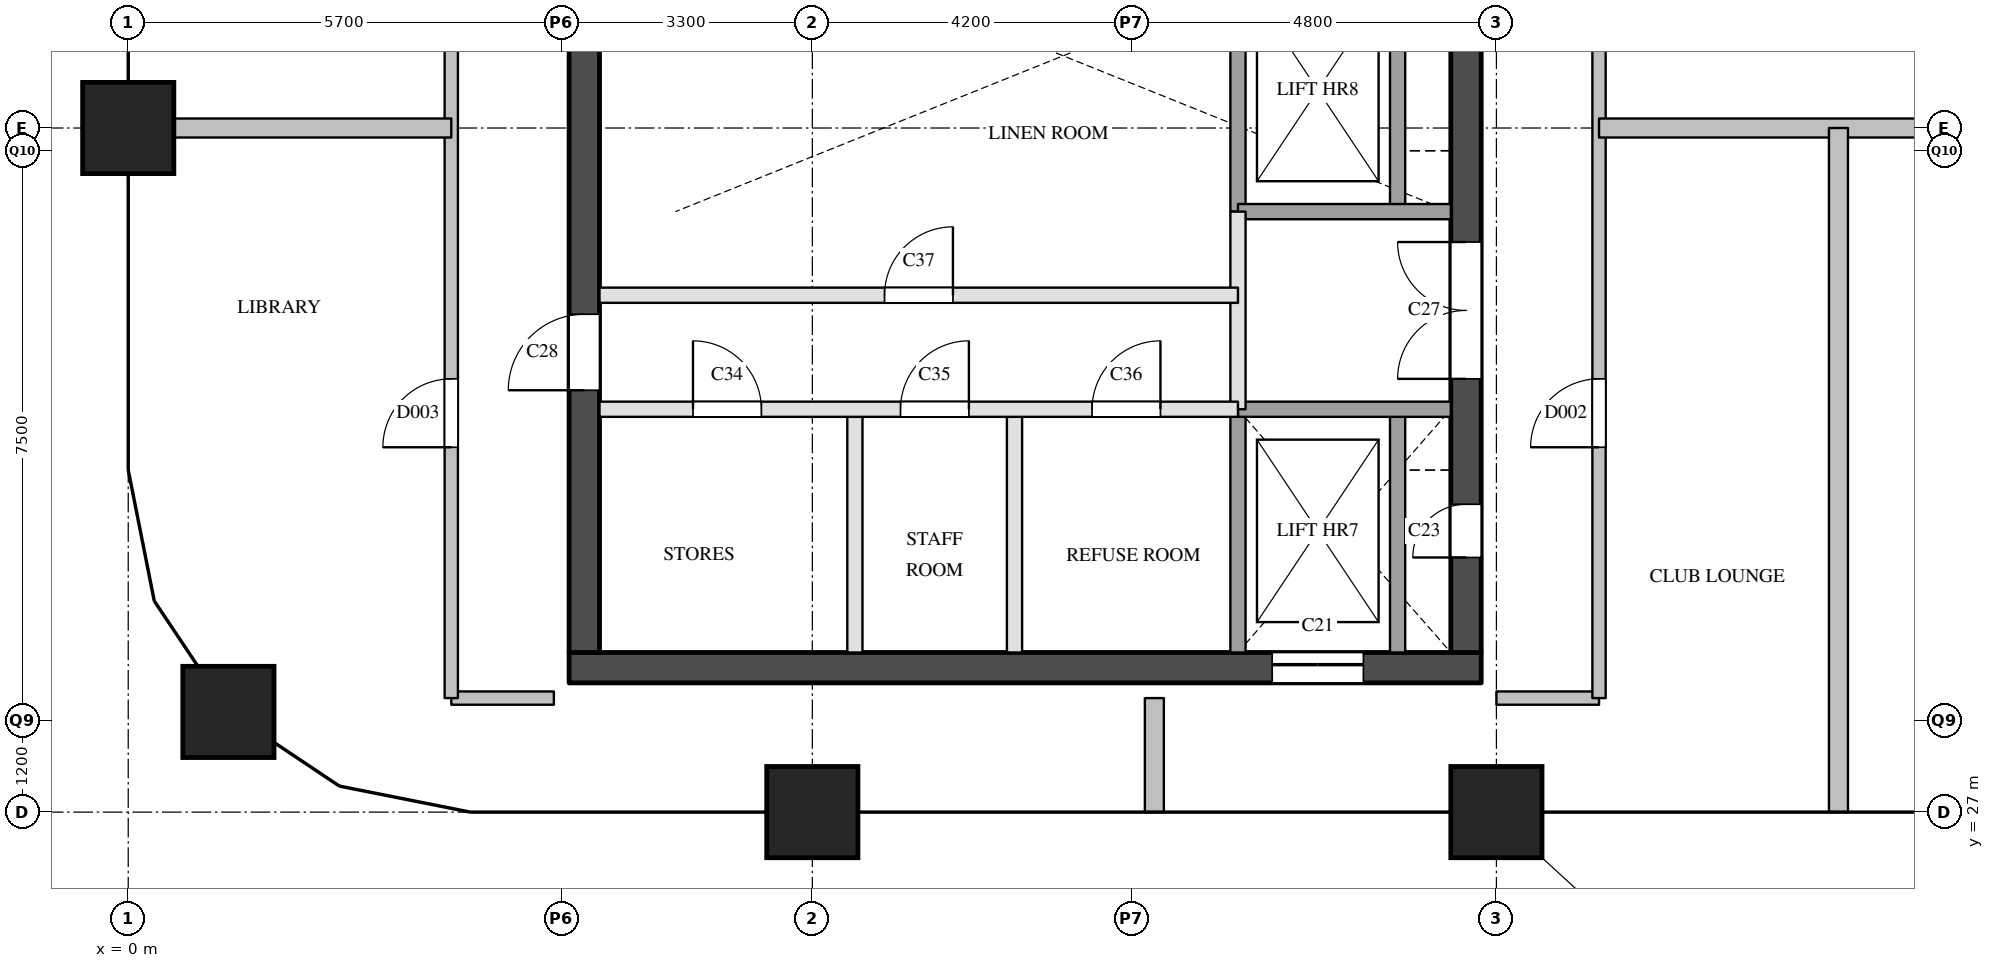
"""IFC4 building model, lengths in metres.
Left out: names, types, materials, properties, quantities, classifications, styles, units other than length and angle.
Written with IfcOpenShell. Run it as: python <this file> out.ifc"""

import sys

from ifc_helpers import new_model, si_unit, direction, frame, frame_2d, origin, origin_2d, place, context, subcontext, project, spatial, rectangle, extrude, element, fill, save


model = new_model("IFC4")
c1 = context("Model", 3, precision=1e-05, world=origin(), true_north=direction((0.0, 1.0)))
c2 = subcontext(c1, "Body", "Model", "MODEL_VIEW")
j1 = project(units=[si_unit("LENGTHUNIT", "METRE"), si_unit("PLANEANGLEUNIT", "RADIAN")], contexts=[c1])
p1 = place(None, origin())
s1 = spatial("IfcSite", under=j1, at=p1, CompositionType="ELEMENT")
p2 = place(p1, origin())
s2 = spatial("IfcBuilding", under=s1, at=p2, CompositionType="ELEMENT")
p3 = place(p2, frame((0.0, 0.0, 230.6)))
s3 = spatial("IfcBuildingStorey", under=s2, at=p3, CompositionType="ELEMENT", Elevation=230.6)
for number, where, z_axis, x_axis in (
    (1, (1.318, 28.318, 0.0), (0.0, 0.0, 1.0), (1.0, 0.0, 0.0)),
    (2, (0.0, 36.0, 0.0), (0.0, 0.0, 1.0), (1.0, 0.0, 0.0)),
    (3, (9.0, 27.0, 0.0), (0.0, 0.0, 1.0), (1.0, 0.0, 0.0)),
    (4, (18.0, 27.0, 0.0), (0.0, 0.0, 1.0), (1.0, 0.0, 0.0)),
):
    element("IfcColumn", number, at=place(p3, frame(where, z_axis=z_axis, x_axis=x_axis)), inside=s3, PredefinedType="COLUMN", context=c2, shape_type="SweptSolid", body=[
        extrude(rectangle(XDim=1.2, YDim=1.2, at=origin_2d()), origin(), (0.0, 0.0, 1.0), 3.9),
    ])
p4 = place(p3, frame((5.8, 28.9, 0.0), z_axis=(0.0, 0.0, 1.0), x_axis=(1.0, 0.0, 0.0)))
e5 = element("IfcWall", 5, at=p4, inside=s3, PredefinedType="SHEAR", context=c2, shape_type="SweptSolid", body=[
    extrude(rectangle(XDim=12.0, YDim=0.4, at=frame_2d((6.0, 0.0))), origin(), (0.0, 0.0, 1.0), 3.6),
])
p5 = place(p4, frame((9.25, 0.0, 0.0)))
e6 = element("IfcOpeningElement", 6, at=p5, cuts=e5, PredefinedType="OPENING", context=c2, shape_type="SweptSolid", body=[
    extrude(rectangle(XDim=1.2, YDim=2.1, at=frame_2d((0.6, 1.05))), frame((0.0, 0.21, 0.0), z_axis=(0.0, -1.0, 0.0), x_axis=(1.0, 0.0, 0.0)), (0.0, 0.0, 1.0), 0.42),
])
p6 = place(p3, frame((6.0, 29.1, 0.0), z_axis=(0.0, 0.0, 1.0), x_axis=(0.0, 1.0, 0.0)))
e7 = element("IfcWall", 7, at=p6, inside=s3, PredefinedType="SHEAR", context=c2, shape_type="SweptSolid", body=[
    extrude(rectangle(XDim=20.3, YDim=0.4, at=frame_2d((10.15, 0.0))), origin(), (0.0, 0.0, 1.0), 3.6),
])
p7 = place(p6, frame((3.45, 0.0, 0.0)))
e8 = element("IfcOpeningElement", 8, at=p7, cuts=e7, PredefinedType="OPENING", context=c2, shape_type="SweptSolid", body=[
    extrude(rectangle(XDim=1.0, YDim=2.1, at=frame_2d((0.5, 1.05))), frame((0.0, 0.21, 0.0), z_axis=(0.0, -1.0, 0.0), x_axis=(1.0, 0.0, 0.0)), (0.0, 0.0, 1.0), 0.42),
])
p8 = place(p6, frame((16.4, 0.0, 0.0)))
e9 = element("IfcOpeningElement", 9, at=p8, cuts=e7, PredefinedType="OPENING", context=c2, shape_type="SweptSolid", body=[
    extrude(rectangle(XDim=1.0, YDim=2.1, at=frame_2d((0.5, 1.05))), frame((0.0, 0.21, 0.0), z_axis=(0.0, -1.0, 0.0), x_axis=(1.0, 0.0, 0.0)), (0.0, 0.0, 1.0), 0.42),
])
p9 = place(p3, frame((17.6, 29.1, 0.0), z_axis=(0.0, 0.0, 1.0), x_axis=(0.0, 1.0, 0.0)))
e10 = element("IfcWall", 10, at=p9, inside=s3, PredefinedType="SHEAR", context=c2, shape_type="SweptSolid", body=[
    extrude(rectangle(XDim=20.3, YDim=0.4, at=frame_2d((10.15, 0.0))), origin(), (0.0, 0.0, 1.0), 3.6),
])
p10 = place(p9, frame((1.25, 0.0, 0.0)))
e11 = element("IfcOpeningElement", 11, at=p10, cuts=e10, PredefinedType="OPENING", context=c2, shape_type="SweptSolid", body=[
    extrude(rectangle(XDim=0.7, YDim=2.1, at=frame_2d((0.35, 1.05))), frame((0.0, 0.21, 0.0), z_axis=(0.0, -1.0, 0.0), x_axis=(1.0, 0.0, 0.0)), (0.0, 0.0, 1.0), 0.42),
])
p11 = place(p9, frame((8.3, 0.0, 0.0)))
e12 = element("IfcOpeningElement", 12, at=p11, cuts=e10, PredefinedType="OPENING", context=c2, shape_type="SweptSolid", body=[
    extrude(rectangle(XDim=0.7, YDim=2.1, at=frame_2d((0.35, 1.05))), frame((0.0, 0.21, 0.0), z_axis=(0.0, -1.0, 0.0), x_axis=(1.0, 0.0, 0.0)), (0.0, 0.0, 1.0), 0.42),
])
p12 = place(p9, frame((3.6, 0.0, 0.0)))
e13 = element("IfcOpeningElement", 13, at=p12, cuts=e10, PredefinedType="OPENING", context=c2, shape_type="SweptSolid", body=[
    extrude(rectangle(XDim=1.8, YDim=2.1, at=frame_2d((0.9, 1.05))), frame((0.0, 0.21, 0.0), z_axis=(0.0, -1.0, 0.0), x_axis=(1.0, 0.0, 0.0)), (0.0, 0.0, 1.0), 0.42),
])
for number, where, z_axis, x_axis in (
    (14, (9.56, 29.1, 0.0), (0.0, 0.0, 1.0), (0.0, 1.0, 0.0)),
    (15, (11.66, 29.1, 0.0), (0.0, 0.0, 1.0), (0.0, 1.0, 0.0)),
):
    element("IfcWall", number, at=place(p3, frame(where, z_axis=z_axis, x_axis=x_axis)), inside=s3, PredefinedType="PARTITIONING", context=c2, shape_type="SweptSolid", body=[
        extrude(rectangle(XDim=3.2, YDim=0.2, at=frame_2d((1.6, 0.0))), origin(), (0.0, 0.0, 1.0), 3.6),
    ])
p13 = place(p3, frame((14.6, 32.3, 0.0), z_axis=(0.0, 0.0, 1.0), x_axis=(0.0, 1.0, 0.0)))
e16 = element("IfcWall", 16, at=p13, inside=s3, PredefinedType="PARTITIONING", context=c2, shape_type="SweptSolid", body=[
    extrude(rectangle(XDim=2.6, YDim=0.2, at=frame_2d((1.3, 0.0))), origin(), (0.0, 0.0, 1.0), 3.6),
])
p14 = place(p3, frame((14.6, 29.1, 0.0), z_axis=(0.0, 0.0, 1.0), x_axis=(0.0, 1.0, 0.0)))
e17 = element("IfcWall", 17, at=p14, inside=s3, PredefinedType="SOLIDWALL", context=c2, shape_type="SweptSolid", body=[
    extrude(rectangle(XDim=3.2, YDim=0.2, at=frame_2d((1.6, 0.0))), origin(), (0.0, 0.0, 1.0), 3.6),
])
p15 = place(p3, frame((14.6, 34.9, 0.0), z_axis=(0.0, 0.0, 1.0), x_axis=(0.0, 1.0, 0.0)))
e18 = element("IfcWall", 18, at=p15, inside=s3, PredefinedType="SOLIDWALL", context=c2, shape_type="SweptSolid", body=[
    extrude(rectangle(XDim=3.2, YDim=0.2, at=frame_2d((1.6, 0.0))), origin(), (0.0, 0.0, 1.0), 3.6),
])
p16 = place(p3, frame((16.7, 29.1, 0.0), z_axis=(0.0, 0.0, 1.0), x_axis=(0.0, 1.0, 0.0)))
e19 = element("IfcWall", 19, at=p16, inside=s3, PredefinedType="SOLIDWALL", context=c2, shape_type="SweptSolid", body=[
    extrude(rectangle(XDim=3.2, YDim=0.2, at=frame_2d((1.6, 0.0))), origin(), (0.0, 0.0, 1.0), 3.6),
])
p17 = place(p3, frame((16.7, 34.9, 0.0), z_axis=(0.0, 0.0, 1.0), x_axis=(0.0, 1.0, 0.0)))
e20 = element("IfcWall", 20, at=p17, inside=s3, PredefinedType="SOLIDWALL", context=c2, shape_type="SweptSolid", body=[
    extrude(rectangle(XDim=3.2, YDim=0.2, at=frame_2d((1.6, 0.0))), origin(), (0.0, 0.0, 1.0), 3.6),
])
p18 = place(p3, frame((6.2, 32.3, 0.0), z_axis=(0.0, 0.0, 1.0), x_axis=(1.0, 0.0, 0.0)))
e21 = element("IfcWall", 21, at=p18, inside=s3, PredefinedType="PARTITIONING", context=c2, shape_type="SweptSolid", body=[
    extrude(rectangle(XDim=8.4, YDim=0.2, at=frame_2d((4.2, 0.0))), origin(), (0.0, 0.0, 1.0), 3.6),
])
p19 = place(p18, frame((1.23, 0.0, 0.0)))
e22 = element("IfcOpeningElement", 22, at=p19, cuts=e21, PredefinedType="OPENING", context=c2, shape_type="SweptSolid", body=[
    extrude(rectangle(XDim=0.9, YDim=2.1, at=frame_2d((0.45, 1.05))), frame((0.0, 0.11, 0.0), z_axis=(0.0, -1.0, 0.0), x_axis=(1.0, 0.0, 0.0)), (0.0, 0.0, 1.0), 0.22),
])
p20 = place(p18, frame((3.96, 0.0, 0.0)))
e23 = element("IfcOpeningElement", 23, at=p20, cuts=e21, PredefinedType="OPENING", context=c2, shape_type="SweptSolid", body=[
    extrude(rectangle(XDim=0.9, YDim=2.1, at=frame_2d((0.45, 1.05))), frame((0.0, 0.11, 0.0), z_axis=(0.0, -1.0, 0.0), x_axis=(1.0, 0.0, 0.0)), (0.0, 0.0, 1.0), 0.22),
])
p21 = place(p18, frame((6.48, 0.0, 0.0)))
e24 = element("IfcOpeningElement", 24, at=p21, cuts=e21, PredefinedType="OPENING", context=c2, shape_type="SweptSolid", body=[
    extrude(rectangle(XDim=0.9, YDim=2.1, at=frame_2d((0.45, 1.05))), frame((0.0, 0.11, 0.0), z_axis=(0.0, -1.0, 0.0), x_axis=(1.0, 0.0, 0.0)), (0.0, 0.0, 1.0), 0.22),
])
p22 = place(p3, frame((14.6, 32.3, 0.0), z_axis=(0.0, 0.0, 1.0), x_axis=(1.0, 0.0, 0.0)))
e25 = element("IfcWall", 25, at=p22, inside=s3, PredefinedType="SOLIDWALL", context=c2, shape_type="SweptSolid", body=[
    extrude(rectangle(XDim=2.8, YDim=0.2, at=frame_2d((1.4, 0.0))), origin(), (0.0, 0.0, 1.0), 3.6),
])
p23 = place(p3, frame((6.2, 33.8, 0.0), z_axis=(0.0, 0.0, 1.0), x_axis=(1.0, 0.0, 0.0)))
e26 = element("IfcWall", 26, at=p23, inside=s3, PredefinedType="PARTITIONING", context=c2, shape_type="SweptSolid", body=[
    extrude(rectangle(XDim=8.4, YDim=0.2, at=frame_2d((4.2, 0.0))), origin(), (0.0, 0.0, 1.0), 3.6),
])
p24 = place(p23, frame((3.75, 0.0, 0.0)))
e27 = element("IfcOpeningElement", 27, at=p24, cuts=e26, PredefinedType="OPENING", context=c2, shape_type="SweptSolid", body=[
    extrude(rectangle(XDim=0.9, YDim=2.1, at=frame_2d((0.45, 1.05))), frame((0.0, 0.11, 0.0), z_axis=(0.0, -1.0, 0.0), x_axis=(1.0, 0.0, 0.0)), (0.0, 0.0, 1.0), 0.22),
])
p25 = place(p3, frame((14.6, 34.9, 0.0), z_axis=(0.0, 0.0, 1.0), x_axis=(1.0, 0.0, 0.0)))
e28 = element("IfcWall", 28, at=p25, inside=s3, PredefinedType="SOLIDWALL", context=c2, shape_type="SweptSolid", body=[
    extrude(rectangle(XDim=2.8, YDim=0.2, at=frame_2d((1.4, 0.0))), origin(), (0.0, 0.0, 1.0), 3.6),
])
for number, where, z_axis, x_axis in (
    (29, (4.25, 28.5, 0.0), (0.0, 0.0, 1.0), (1.0, 0.0, 0.0)),
    (30, (18.0, 28.5, 0.0), (0.0, 0.0, 1.0), (1.0, 0.0, 0.0)),
):
    element("IfcWall", number, at=place(p3, frame(where, z_axis=z_axis, x_axis=x_axis)), inside=s3, PredefinedType="PARTITIONING", context=c2, shape_type="SweptSolid", body=[
        extrude(rectangle(XDim=1.35, YDim=0.175, at=frame_2d((0.675, 0.0))), origin(), (0.0, 0.0, 1.0), 3.6),
    ])
p26 = place(p3, frame((4.25, 28.5, 0.0), z_axis=(0.0, 0.0, 1.0), x_axis=(0.0, 1.0, 0.0)))
e31 = element("IfcWall", 31, at=p26, inside=s3, PredefinedType="PARTITIONING", context=c2, shape_type="SweptSolid", body=[
    extrude(rectangle(XDim=22.85, YDim=0.175, at=frame_2d((11.425, 0.0))), origin(), (0.0, 0.0, 1.0), 3.6),
])
p27 = place(p26, frame((3.3, 0.0, 0.0)))
e32 = element("IfcOpeningElement", 32, at=p27, cuts=e31, PredefinedType="OPENING", context=c2, shape_type="SweptSolid", body=[
    extrude(rectangle(XDim=0.9, YDim=2.1, at=frame_2d((0.45, 1.05))), frame((0.0, 0.097, 0.0), z_axis=(0.0, -1.0, 0.0), x_axis=(1.0, 0.0, 0.0)), (0.0, 0.0, 1.0), 0.195),
])
p28 = place(p26, frame((11.55, 0.0, 0.0)))
e33 = element("IfcOpeningElement", 33, at=p28, cuts=e31, PredefinedType="OPENING", context=c2, shape_type="SweptSolid", body=[
    extrude(rectangle(XDim=0.9, YDim=2.1, at=frame_2d((0.45, 1.05))), frame((0.0, 0.097, 0.0), z_axis=(0.0, -1.0, 0.0), x_axis=(1.0, 0.0, 0.0)), (0.0, 0.0, 1.0), 0.195),
])
p29 = place(p26, frame((19.225, 0.0, 0.0)))
e34 = element("IfcOpeningElement", 34, at=p29, cuts=e31, PredefinedType="OPENING", context=c2, shape_type="SweptSolid", body=[
    extrude(rectangle(XDim=0.9, YDim=2.1, at=frame_2d((0.45, 1.05))), frame((0.0, 0.097, 0.0), z_axis=(0.0, -1.0, 0.0), x_axis=(1.0, 0.0, 0.0)), (0.0, 0.0, 1.0), 0.195),
])
p30 = place(p3, frame((19.35, 28.5, 0.0), z_axis=(0.0, 0.0, 1.0), x_axis=(0.0, 1.0, 0.0)))
e35 = element("IfcWall", 35, at=p30, inside=s3, PredefinedType="PARTITIONING", context=c2, shape_type="SweptSolid", body=[
    extrude(rectangle(XDim=22.85, YDim=0.175, at=frame_2d((11.425, 0.0))), origin(), (0.0, 0.0, 1.0), 3.6),
])
p31 = place(p30, frame((3.3, 0.0, 0.0)))
e36 = element("IfcOpeningElement", 36, at=p31, cuts=e35, PredefinedType="OPENING", context=c2, shape_type="SweptSolid", body=[
    extrude(rectangle(XDim=0.9, YDim=2.1, at=frame_2d((0.45, 1.05))), frame((0.0, 0.097, 0.0), z_axis=(0.0, -1.0, 0.0), x_axis=(1.0, 0.0, 0.0)), (0.0, 0.0, 1.0), 0.195),
])
p32 = place(p30, frame((11.55, 0.0, 0.0)))
e37 = element("IfcOpeningElement", 37, at=p32, cuts=e35, PredefinedType="OPENING", context=c2, shape_type="SweptSolid", body=[
    extrude(rectangle(XDim=0.9, YDim=2.1, at=frame_2d((0.45, 1.05))), frame((0.0, 0.097, 0.0), z_axis=(0.0, -1.0, 0.0), x_axis=(1.0, 0.0, 0.0)), (0.0, 0.0, 1.0), 0.195),
])
p33 = place(p30, frame((19.225, 0.0, 0.0)))
e38 = element("IfcOpeningElement", 38, at=p33, cuts=e35, PredefinedType="OPENING", context=c2, shape_type="SweptSolid", body=[
    extrude(rectangle(XDim=0.9, YDim=2.1, at=frame_2d((0.45, 1.05))), frame((0.0, 0.097, 0.0), z_axis=(0.0, -1.0, 0.0), x_axis=(1.0, 0.0, 0.0)), (0.0, 0.0, 1.0), 0.195),
])
p34 = place(p3, frame((0.0, 36.0, 0.0), z_axis=(0.0, 0.0, 1.0), x_axis=(1.0, 0.0, 0.0)))
e39 = element("IfcWall", 39, at=p34, inside=s3, PredefinedType="PARTITIONING", context=c2, shape_type="SweptSolid", body=[
    extrude(rectangle(XDim=4.25, YDim=0.25, at=frame_2d((2.125, 0.0))), origin(), (0.0, 0.0, 1.0), 3.6),
])
p35 = place(p3, frame((19.35, 36.0, 0.0), z_axis=(0.0, 0.0, 1.0), x_axis=(1.0, 0.0, 0.0)))
e40 = element("IfcWall", 40, at=p35, inside=s3, PredefinedType="PARTITIONING", context=c2, shape_type="SweptSolid", body=[
    extrude(rectangle(XDim=15.3, YDim=0.25, at=frame_2d((7.65, 0.0))), origin(), (0.0, 0.0, 1.0), 3.6),
])
p36 = place(p3, frame((13.5, 27.0, 0.0), z_axis=(0.0, 0.0, 1.0), x_axis=(0.0, 1.0, 0.0)))
e41 = element("IfcWall", 41, at=p36, inside=s3, PredefinedType="PARTITIONING", context=c2, shape_type="SweptSolid", body=[
    extrude(rectangle(XDim=1.5, YDim=0.25, at=frame_2d((0.75, 0.0))), origin(), (0.0, 0.0, 1.0), 2.49),
])
p37 = place(p3, frame((22.5, 27.0, 0.0), z_axis=(0.0, 0.0, 1.0), x_axis=(0.0, 1.0, 0.0)))
e42 = element("IfcWall", 42, at=p37, inside=s3, PredefinedType="PARTITIONING", context=c2, shape_type="SweptSolid", body=[
    extrude(rectangle(XDim=9.0, YDim=0.25, at=frame_2d((4.5, 0.0))), origin(), (0.0, 0.0, 1.0), 3.6),
])
p38 = place(p5, origin())
e43 = element("IfcDoor", 43, at=p38, inside=s3, OperationType="SLIDING_TO_LEFT", PredefinedType="DOOR", context=c2, shape_type="SweptSolid", body=[
    extrude(rectangle(XDim=1.2, YDim=2.1, at=frame_2d((0.6, 1.05))), frame((0.0, 0.025, 0.0), z_axis=(0.0, -1.0, 0.0), x_axis=(1.0, 0.0, 0.0)), (0.0, 0.0, 1.0), 0.05),
])
fill(e6, e43)
p39 = place(p10, origin())
e44 = element("IfcDoor", 44, at=p39, inside=s3, OperationType="SINGLE_SWING_LEFT", PredefinedType="DOOR", context=c2, shape_type="SweptSolid", body=[
    extrude(rectangle(XDim=0.7, YDim=2.1, at=frame_2d((0.35, 1.05))), frame((0.0, 0.025, 0.0), z_axis=(0.0, -1.0, 0.0), x_axis=(1.0, 0.0, 0.0)), (0.0, 0.0, 1.0), 0.05),
])
fill(e11, e44)
p40 = place(p12, origin())
e45 = element("IfcDoor", 45, at=p40, inside=s3, OperationType="DOUBLE_DOOR_SINGLE_SWING", PredefinedType="DOOR", context=c2, shape_type="SweptSolid", body=[
    extrude(rectangle(XDim=1.8, YDim=2.1, at=frame_2d((0.9, 1.05))), frame((0.0, 0.025, 0.0), z_axis=(0.0, -1.0, 0.0), x_axis=(1.0, 0.0, 0.0)), (0.0, 0.0, 1.0), 0.05),
])
fill(e13, e45)
p41 = place(p7, origin())
e46 = element("IfcDoor", 46, at=p41, inside=s3, OperationType="SINGLE_SWING_LEFT", PredefinedType="DOOR", context=c2, shape_type="SweptSolid", body=[
    extrude(rectangle(XDim=1.0, YDim=2.1, at=frame_2d((0.5, 1.05))), frame((0.0, 0.025, 0.0), z_axis=(0.0, -1.0, 0.0), x_axis=(1.0, 0.0, 0.0)), (0.0, 0.0, 1.0), 0.05),
])
fill(e8, e46)
p42 = place(p19, origin())
e47 = element("IfcDoor", 47, at=p42, inside=s3, OperationType="SINGLE_SWING_LEFT", PredefinedType="DOOR", context=c2, shape_type="SweptSolid", body=[
    extrude(rectangle(XDim=0.9, YDim=2.1, at=frame_2d((0.45, 1.05))), frame((0.0, 0.025, 0.0), z_axis=(0.0, -1.0, 0.0), x_axis=(1.0, 0.0, 0.0)), (0.0, 0.0, 1.0), 0.05),
])
fill(e22, e47)
p43 = place(p20, origin())
e48 = element("IfcDoor", 48, at=p43, inside=s3, OperationType="SINGLE_SWING_RIGHT", PredefinedType="DOOR", context=c2, shape_type="SweptSolid", body=[
    extrude(rectangle(XDim=0.9, YDim=2.1, at=frame_2d((0.45, 1.05))), frame((0.0, 0.025, 0.0), z_axis=(0.0, -1.0, 0.0), x_axis=(1.0, 0.0, 0.0)), (0.0, 0.0, 1.0), 0.05),
])
fill(e23, e48)
p44 = place(p21, origin())
e49 = element("IfcDoor", 49, at=p44, inside=s3, OperationType="SINGLE_SWING_RIGHT", PredefinedType="DOOR", context=c2, shape_type="SweptSolid", body=[
    extrude(rectangle(XDim=0.9, YDim=2.1, at=frame_2d((0.45, 1.05))), frame((0.0, 0.025, 0.0), z_axis=(0.0, -1.0, 0.0), x_axis=(1.0, 0.0, 0.0)), (0.0, 0.0, 1.0), 0.05),
])
fill(e24, e49)
p45 = place(p24, origin())
e50 = element("IfcDoor", 50, at=p45, inside=s3, OperationType="SINGLE_SWING_RIGHT", PredefinedType="DOOR", context=c2, shape_type="SweptSolid", body=[
    extrude(rectangle(XDim=0.9, YDim=2.1, at=frame_2d((0.45, 1.05))), frame((0.0, 0.025, 0.0), z_axis=(0.0, -1.0, 0.0), x_axis=(1.0, 0.0, 0.0)), (0.0, 0.0, 1.0), 0.05),
])
fill(e27, e50)
p46 = place(p31, origin())
e51 = element("IfcDoor", 51, at=p46, inside=s3, OperationType="SINGLE_SWING_LEFT", PredefinedType="DOOR", context=c2, shape_type="SweptSolid", body=[
    extrude(rectangle(XDim=0.9, YDim=2.1, at=frame_2d((0.45, 1.05))), frame((0.0, 0.025, 0.0), z_axis=(0.0, -1.0, 0.0), x_axis=(1.0, 0.0, 0.0)), (0.0, 0.0, 1.0), 0.05),
])
fill(e36, e51)
p47 = place(p27, origin())
e52 = element("IfcDoor", 52, at=p47, inside=s3, OperationType="SINGLE_SWING_LEFT", PredefinedType="DOOR", context=c2, shape_type="SweptSolid", body=[
    extrude(rectangle(XDim=0.9, YDim=2.1, at=frame_2d((0.45, 1.05))), frame((0.0, 0.025, 0.0), z_axis=(0.0, -1.0, 0.0), x_axis=(1.0, 0.0, 0.0)), (0.0, 0.0, 1.0), 0.05),
])
fill(e32, e52)
save(model, sys.argv[1])
